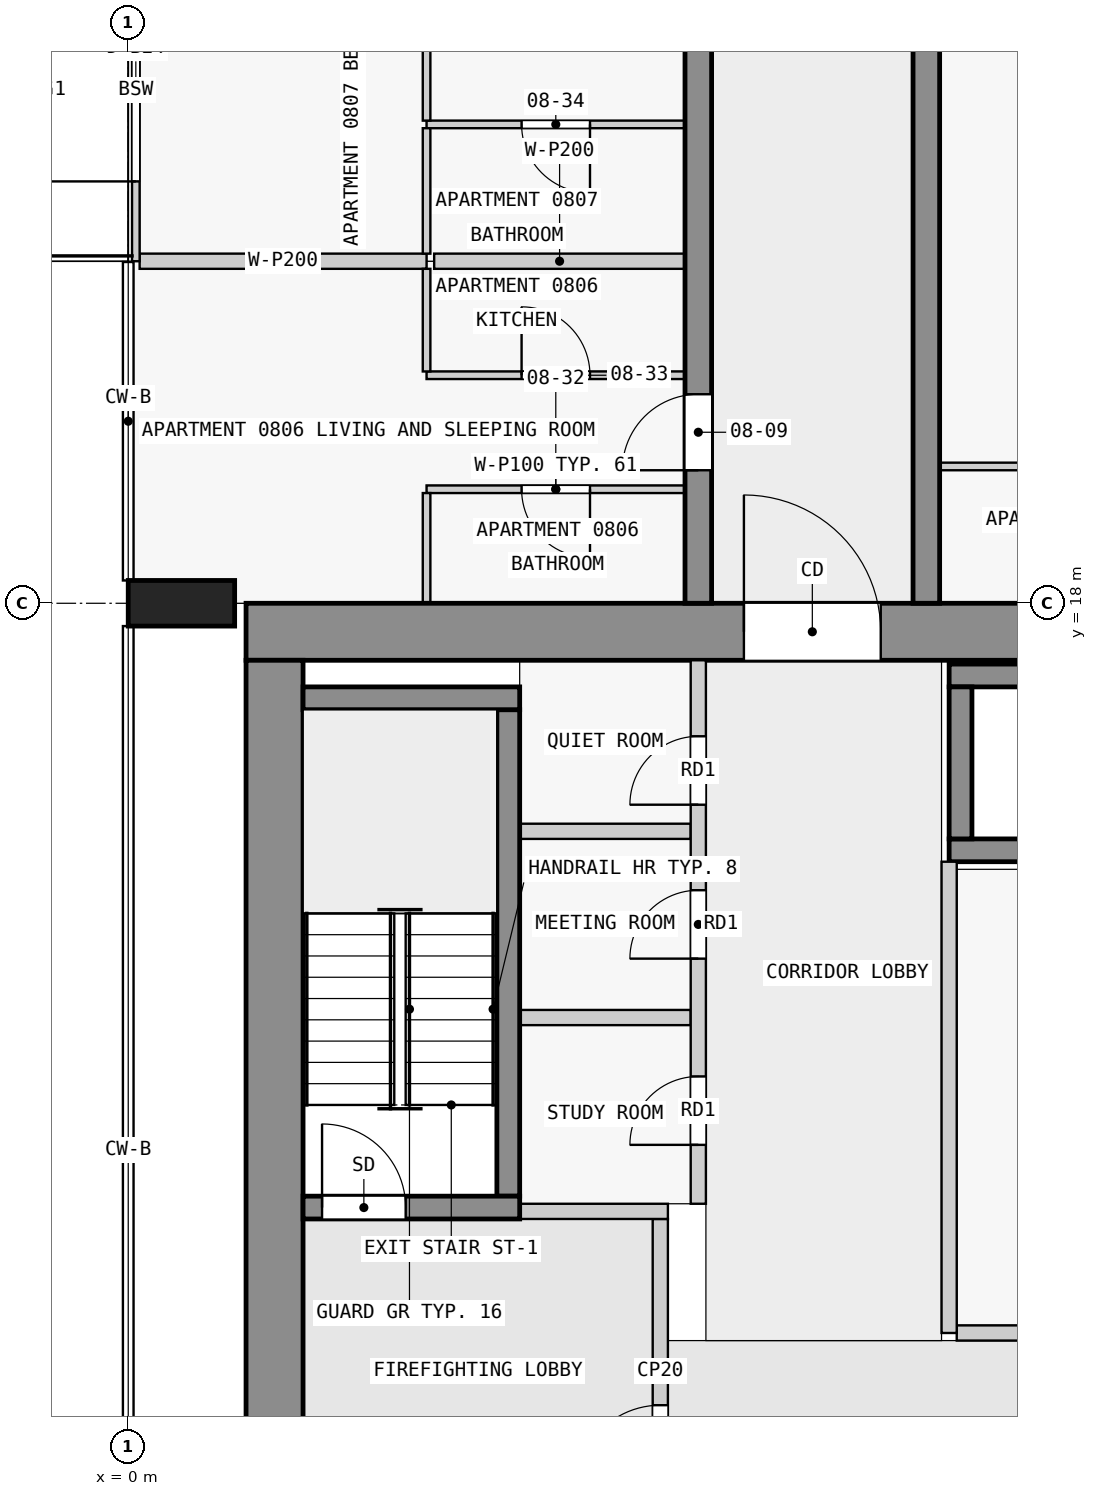
"""IFC4 building model, lengths in metres.
Left out: names, types, materials, properties, quantities, classifications, styles, units other than length and angle.
Written with IfcOpenShell. Run it as: python <this file> out.ifc"""

import sys

from ifc_helpers import new_model, si_unit, direction, frame, frame_2d, origin, origin_2d, place, context, subcontext, project, spatial, rectangle, extrude, element, fill, save


model = new_model("IFC4")
c1 = context("Model", 3, precision=1e-05, world=origin(), true_north=direction((0.0, 1.0)))
c2 = subcontext(c1, "Body", "Model", "MODEL_VIEW")
j1 = project(units=[si_unit("LENGTHUNIT", "METRE"), si_unit("PLANEANGLEUNIT", "RADIAN")], contexts=[c1])
p1 = place(None, origin())
s1 = spatial("IfcSite", under=j1, at=p1, CompositionType="ELEMENT")
p2 = place(p1, origin())
s2 = spatial("IfcBuilding", under=s1, at=p2, CompositionType="ELEMENT")
p3 = place(p2, frame((0.0, 0.0, 37.3)))
s3 = spatial("IfcBuildingStorey", under=s2, at=p3, CompositionType="ELEMENT", Elevation=37.3)
p4 = place(p3, frame((0.7, 18.0, 0.0), z_axis=(0.0, 0.0, 1.0), x_axis=(0.0, 1.0, 0.0)))
e1 = element("IfcColumn", 1, at=p4, inside=s3, PredefinedType="COLUMN", context=c2, shape_type="SweptSolid", body=[
    extrude(rectangle(XDim=0.6, YDim=1.4, at=origin_2d()), origin(), (0.0, 0.0, 1.0), 3.5),
])
p5 = place(p3, frame((1.55, 17.625, 0.0), z_axis=(0.0, 0.0, 1.0), x_axis=(1.0, 0.0, 0.0)))
e2 = element("IfcWall", 2, at=p5, inside=s3, PredefinedType="SHEAR", context=c2, shape_type="SweptSolid", body=[
    extrude(rectangle(XDim=20.95, YDim=0.75, at=frame_2d((10.475, 0.0))), origin(), (0.0, 0.0, 1.0), 3.25),
])
p6 = place(p5, frame((6.55, 0.0, 0.0)))
e3 = element("IfcOpeningElement", 3, at=p6, cuts=e2, PredefinedType="OPENING", context=c2, shape_type="SweptSolid", body=[
    extrude(rectangle(XDim=1.8, YDim=2.1, at=frame_2d((0.9, 1.05))), frame((0.0, 0.385, 0.0), z_axis=(0.0, -1.0, 0.0), x_axis=(1.0, 0.0, 0.0)), (0.0, 0.0, 1.0), 0.77),
])
p7 = place(p3, frame((1.925, 2.5, 0.0), z_axis=(0.0, 0.0, 1.0), x_axis=(0.0, 1.0, 0.0)))
e4 = element("IfcWall", 4, at=p7, inside=s3, PredefinedType="SHEAR", context=c2, shape_type="SweptSolid", body=[
    extrude(rectangle(XDim=14.75, YDim=0.75, at=frame_2d((7.375, 0.0))), origin(), (0.0, 0.0, 1.0), 3.25),
])
p8 = place(p3, frame((2.3, 10.05, 0.0), z_axis=(0.0, 0.0, 1.0), x_axis=(1.0, 0.0, 0.0)))
e5 = element("IfcWall", 5, at=p8, inside=s3, PredefinedType="SHEAR", context=c2, shape_type="SweptSolid", body=[
    extrude(rectangle(XDim=2.85, YDim=0.3, at=frame_2d((1.425, 0.0))), origin(), (0.0, 0.0, 1.0), 3.25),
])
p9 = place(p8, frame((0.25, 0.0, 0.0)))
e6 = element("IfcOpeningElement", 6, at=p9, cuts=e5, PredefinedType="OPENING", context=c2, shape_type="SweptSolid", body=[
    extrude(rectangle(XDim=1.1, YDim=2.1, at=frame_2d((0.55, 1.05))), frame((0.0, 0.16, 0.0), z_axis=(0.0, -1.0, 0.0), x_axis=(1.0, 0.0, 0.0)), (0.0, 0.0, 1.0), 0.32),
])
p10 = place(p3, frame((5.0, 10.2, 0.0), z_axis=(0.0, 0.0, 1.0), x_axis=(0.0, 1.0, 0.0)))
e7 = element("IfcWall", 7, at=p10, inside=s3, PredefinedType="SHEAR", context=c2, shape_type="SweptSolid", body=[
    extrude(rectangle(XDim=6.4, YDim=0.3, at=frame_2d((3.2, 0.0))), origin(), (0.0, 0.0, 1.0), 3.25),
])
p11 = place(p3, frame((2.3, 16.75, 0.0), z_axis=(0.0, 0.0, 1.0), x_axis=(1.0, 0.0, 0.0)))
e8 = element("IfcWall", 8, at=p11, inside=s3, PredefinedType="SHEAR", context=c2, shape_type="SweptSolid", body=[
    extrude(rectangle(XDim=2.85, YDim=0.3, at=frame_2d((1.425, 0.0))), origin(), (0.0, 0.0, 1.0), 3.25),
])
for number, where, z_axis, x_axis in (
    (9, (10.8, 17.05, 0.0), (0.0, 0.0, 1.0), (1.0, 0.0, 0.0)),
    (10, (10.8, 14.75, 0.0), (0.0, 0.0, 1.0), (1.0, 0.0, 0.0)),
):
    element("IfcWall", number, at=place(p3, frame(where, z_axis=z_axis, x_axis=x_axis)), inside=s3, PredefinedType="SHEAR", context=c2, shape_type="SweptSolid", body=[
        extrude(rectangle(XDim=7.8, YDim=0.3, at=frame_2d((3.9, 0.0))), origin(), (0.0, 0.0, 1.0), 3.25),
    ])
p12 = place(p3, frame((10.95, 14.9, 0.0), z_axis=(0.0, 0.0, 1.0), x_axis=(0.0, 1.0, 0.0)))
e11 = element("IfcWall", 11, at=p12, inside=s3, PredefinedType="SHEAR", context=c2, shape_type="SweptSolid", body=[
    extrude(rectangle(XDim=2.0, YDim=0.3, at=frame_2d((1.0, 0.0))), origin(), (0.0, 0.0, 1.0), 3.25),
])
p13 = place(p3, frame((7.5, 18.0, 0.0), z_axis=(0.0, 0.0, 1.0), x_axis=(0.0, 1.0, 0.0)))
e12 = element("IfcWall", 12, at=p13, inside=s3, PredefinedType="SHEAR", context=c2, shape_type="SweptSolid", body=[
    extrude(rectangle(XDim=27.0, YDim=0.35, at=frame_2d((13.5, 0.0))), origin(), (0.0, 0.0, 1.0), 3.25),
])
p14 = place(p13, frame((1.75, 0.0, 0.0)))
e13 = element("IfcOpeningElement", 13, at=p14, cuts=e12, PredefinedType="OPENING", context=c2, shape_type="SweptSolid", body=[
    extrude(rectangle(XDim=1.0, YDim=2.1, at=frame_2d((0.5, 1.05))), frame((0.0, 0.185, 0.0), z_axis=(0.0, -1.0, 0.0), x_axis=(1.0, 0.0, 0.0)), (0.0, 0.0, 1.0), 0.37),
])
p15 = place(p13, frame((8.55, 0.0, 0.0)))
e14 = element("IfcOpeningElement", 14, at=p15, cuts=e12, PredefinedType="OPENING", context=c2, shape_type="SweptSolid", body=[
    extrude(rectangle(XDim=1.0, YDim=2.1, at=frame_2d((0.5, 1.05))), frame((0.0, 0.185, 0.0), z_axis=(0.0, -1.0, 0.0), x_axis=(1.0, 0.0, 0.0)), (0.0, 0.0, 1.0), 0.37),
])
p16 = place(p13, frame((15.25, 0.0, 0.0)))
e15 = element("IfcOpeningElement", 15, at=p16, cuts=e12, PredefinedType="OPENING", context=c2, shape_type="SweptSolid", body=[
    extrude(rectangle(XDim=1.0, YDim=2.1, at=frame_2d((0.5, 1.05))), frame((0.0, 0.185, 0.0), z_axis=(0.0, -1.0, 0.0), x_axis=(1.0, 0.0, 0.0)), (0.0, 0.0, 1.0), 0.37),
])
p17 = place(p13, frame((21.35, 0.0, 0.0)))
e16 = element("IfcOpeningElement", 16, at=p17, cuts=e12, PredefinedType="OPENING", context=c2, shape_type="SweptSolid", body=[
    extrude(rectangle(XDim=1.0, YDim=2.1, at=frame_2d((0.5, 1.05))), frame((0.0, 0.185, 0.0), z_axis=(0.0, -1.0, 0.0), x_axis=(1.0, 0.0, 0.0)), (0.0, 0.0, 1.0), 0.37),
])
p18 = place(p3, frame((10.5, 18.0, 0.0), z_axis=(0.0, 0.0, 1.0), x_axis=(0.0, 1.0, 0.0)))
e17 = element("IfcWall", 17, at=p18, inside=s3, PredefinedType="SHEAR", context=c2, shape_type="SweptSolid", body=[
    extrude(rectangle(XDim=27.0, YDim=0.35, at=frame_2d((13.5, 0.0))), origin(), (0.0, 0.0, 1.0), 3.25),
])
p19 = place(p18, frame((7.45, 0.0, 0.0)))
e18 = element("IfcOpeningElement", 18, at=p19, cuts=e17, PredefinedType="OPENING", context=c2, shape_type="SweptSolid", body=[
    extrude(rectangle(XDim=1.0, YDim=2.1, at=frame_2d((0.5, 1.05))), frame((0.0, 0.185, 0.0), z_axis=(0.0, -1.0, 0.0), x_axis=(1.0, 0.0, 0.0)), (0.0, 0.0, 1.0), 0.37),
])
p20 = place(p18, frame((19.75, 0.0, 0.0)))
e19 = element("IfcOpeningElement", 19, at=p20, cuts=e17, PredefinedType="OPENING", context=c2, shape_type="SweptSolid", body=[
    extrude(rectangle(XDim=1.0, YDim=2.1, at=frame_2d((0.5, 1.05))), frame((0.0, 0.185, 0.0), z_axis=(0.0, -1.0, 0.0), x_axis=(1.0, 0.0, 0.0)), (0.0, 0.0, 1.0), 0.37),
])
p21 = place(p18, frame((23.25, 0.0, 0.0)))
e20 = element("IfcOpeningElement", 20, at=p21, cuts=e17, PredefinedType="OPENING", context=c2, shape_type="SweptSolid", body=[
    extrude(rectangle(XDim=0.9, YDim=2.1, at=frame_2d((0.45, 1.05))), frame((0.0, 0.185, 0.0), z_axis=(0.0, -1.0, 0.0), x_axis=(1.0, 0.0, 0.0)), (0.0, 0.0, 1.0), 0.37),
])
p22 = place(p18, frame((25.45, 0.0, 0.0)))
e21 = element("IfcOpeningElement", 21, at=p22, cuts=e17, PredefinedType="OPENING", context=c2, shape_type="SweptSolid", body=[
    extrude(rectangle(XDim=1.0, YDim=2.1, at=frame_2d((0.5, 1.05))), frame((0.0, 0.185, 0.0), z_axis=(0.0, -1.0, 0.0), x_axis=(1.0, 0.0, 0.0)), (0.0, 0.0, 1.0), 0.37),
])
p23 = place(p3, frame((0.1, 22.5, 0.0), z_axis=(0.0, 0.0, 1.0), x_axis=(0.0, 1.0, 0.0)))
e22 = element("IfcWall", 22, at=p23, inside=s3, PredefinedType="STANDARD", context=c2, shape_type="SweptSolid", body=[
    extrude(rectangle(XDim=4.5, YDim=0.1, at=frame_2d((2.25, 0.0))), origin(), (0.0, 0.0, 1.0), 3.25),
])
p24 = place(p23, frame((1.05, 0.0, 0.0)))
e23 = element("IfcOpeningElement", 23, at=p24, cuts=e22, PredefinedType="OPENING", context=c2, shape_type="SweptSolid", body=[
    extrude(rectangle(XDim=2.4, YDim=2.4, at=frame_2d((1.2, 1.2))), frame((0.0, 0.06, 0.0), z_axis=(0.0, -1.0, 0.0), x_axis=(1.0, 0.0, 0.0)), (0.0, 0.0, 1.0), 0.12),
])
p25 = place(p3, frame((7.0, 5.9, 0.0), z_axis=(0.0, 0.0, 1.0), x_axis=(0.0, 1.0, 0.0)))
e24 = element("IfcWall", 24, at=p25, inside=s3, PredefinedType="PARTITIONING", context=c2, shape_type="SweptSolid", body=[
    extrude(rectangle(XDim=4.0, YDim=0.2, at=frame_2d((2.0, 0.0))), origin(), (0.0, 0.0, 1.0), 3.25),
])
p26 = place(p25, frame((0.45, 0.0, 0.0)))
e25 = element("IfcOpeningElement", 25, at=p26, cuts=e24, PredefinedType="OPENING", context=c2, shape_type="SweptSolid", body=[
    extrude(rectangle(XDim=1.1, YDim=2.1, at=frame_2d((0.55, 1.05))), frame((0.0, 0.11, 0.0), z_axis=(0.0, -1.0, 0.0), x_axis=(1.0, 0.0, 0.0)), (0.0, 0.0, 1.0), 0.22),
])
p27 = place(p3, frame((5.15, 10.0, 0.0), z_axis=(0.0, 0.0, 1.0), x_axis=(1.0, 0.0, 0.0)))
e26 = element("IfcWall", 26, at=p27, inside=s3, PredefinedType="PARTITIONING", context=c2, shape_type="SweptSolid", body=[
    extrude(rectangle(XDim=1.95, YDim=0.2, at=frame_2d((0.975, 0.0))), origin(), (0.0, 0.0, 1.0), 3.25),
])
p28 = place(p3, frame((10.8, 8.4, 0.0), z_axis=(0.0, 0.0, 1.0), x_axis=(0.0, 1.0, 0.0)))
e27 = element("IfcWall", 27, at=p28, inside=s3, PredefinedType="PARTITIONING", context=c2, shape_type="SweptSolid", body=[
    extrude(rectangle(XDim=6.2, YDim=0.2, at=frame_2d((3.1, 0.0))), origin(), (0.0, 0.0, 1.0), 3.25),
])
p29 = place(p3, frame((10.9, 8.4, 0.0), z_axis=(0.0, 0.0, 1.0), x_axis=(1.0, 0.0, 0.0)))
e28 = element("IfcWall", 28, at=p29, inside=s3, PredefinedType="PARTITIONING", context=c2, shape_type="SweptSolid", body=[
    extrude(rectangle(XDim=7.4, YDim=0.2, at=frame_2d((3.7, 0.0))), origin(), (0.0, 0.0, 1.0), 3.25),
])
p30 = place(p3, frame((7.5, 10.1, 0.0), z_axis=(0.0, 0.0, 1.0), x_axis=(0.0, 1.0, 0.0)))
e29 = element("IfcWall", 29, at=p30, inside=s3, PredefinedType="PARTITIONING", context=c2, shape_type="SweptSolid", body=[
    extrude(rectangle(XDim=7.15, YDim=0.2, at=frame_2d((3.575, 0.0))), origin(), (0.0, 0.0, 1.0), 3.25),
])
p31 = place(p30, frame((0.775, 0.0, 0.0)))
e30 = element("IfcOpeningElement", 30, at=p31, cuts=e29, PredefinedType="OPENING", context=c2, shape_type="SweptSolid", body=[
    extrude(rectangle(XDim=0.9, YDim=2.1, at=frame_2d((0.45, 1.05))), frame((0.0, 0.11, 0.0), z_axis=(0.0, -1.0, 0.0), x_axis=(1.0, 0.0, 0.0)), (0.0, 0.0, 1.0), 0.22),
])
p32 = place(p30, frame((3.225, 0.0, 0.0)))
e31 = element("IfcOpeningElement", 31, at=p32, cuts=e29, PredefinedType="OPENING", context=c2, shape_type="SweptSolid", body=[
    extrude(rectangle(XDim=0.9, YDim=2.1, at=frame_2d((0.45, 1.05))), frame((0.0, 0.11, 0.0), z_axis=(0.0, -1.0, 0.0), x_axis=(1.0, 0.0, 0.0)), (0.0, 0.0, 1.0), 0.22),
])
p33 = place(p30, frame((5.25, 0.0, 0.0)))
e32 = element("IfcOpeningElement", 32, at=p33, cuts=e29, PredefinedType="OPENING", context=c2, shape_type="SweptSolid", body=[
    extrude(rectangle(XDim=0.9, YDim=2.1, at=frame_2d((0.45, 1.05))), frame((0.0, 0.11, 0.0), z_axis=(0.0, -1.0, 0.0), x_axis=(1.0, 0.0, 0.0)), (0.0, 0.0, 1.0), 0.22),
])
for number, where, z_axis, x_axis in (
    (33, (5.15, 12.55, 0.0), (0.0, 0.0, 1.0), (1.0, 0.0, 0.0)),
    (34, (5.15, 15.0, 0.0), (0.0, 0.0, 1.0), (1.0, 0.0, 0.0)),
):
    element("IfcWall", number, at=place(p3, frame(where, z_axis=z_axis, x_axis=x_axis)), inside=s3, PredefinedType="PARTITIONING", context=c2, shape_type="SweptSolid", body=[
        extrude(rectangle(XDim=2.25, YDim=0.2, at=frame_2d((1.125, 0.0))), origin(), (0.0, 0.0, 1.0), 3.25),
    ])
p34 = place(p3, frame((7.325, 19.5, 0.0), z_axis=(0.0, 0.0, 1.0), x_axis=(-1.0, 0.0, 0.0)))
e35 = element("IfcWall", 35, at=p34, inside=s3, PredefinedType="PARTITIONING", context=c2, shape_type="SweptSolid", body=[
    extrude(rectangle(XDim=3.4, YDim=0.1, at=frame_2d((1.7, 0.0))), origin(), (0.0, 0.0, 1.0), 3.25),
])
p35 = place(p34, frame((1.25, 0.0, 0.0)))
e36 = element("IfcOpeningElement", 36, at=p35, cuts=e35, PredefinedType="OPENING", context=c2, shape_type="SweptSolid", body=[
    extrude(rectangle(XDim=0.9, YDim=2.1, at=frame_2d((0.45, 1.05))), frame((0.0, 0.06, 0.0), z_axis=(0.0, -1.0, 0.0), x_axis=(1.0, 0.0, 0.0)), (0.0, 0.0, 1.0), 0.12),
])
p36 = place(p3, frame((14.025, 19.8, 0.0), z_axis=(0.0, 0.0, 1.0), x_axis=(-1.0, 0.0, 0.0)))
e37 = element("IfcWall", 37, at=p36, inside=s3, PredefinedType="PARTITIONING", context=c2, shape_type="SweptSolid", body=[
    extrude(rectangle(XDim=3.35, YDim=0.1, at=frame_2d((1.675, 0.0))), origin(), (0.0, 0.0, 1.0), 3.25),
])
p37 = place(p36, frame((1.25, 0.0, 0.0)))
e38 = element("IfcOpeningElement", 38, at=p37, cuts=e37, PredefinedType="OPENING", context=c2, shape_type="SweptSolid", body=[
    extrude(rectangle(XDim=0.9, YDim=2.1, at=frame_2d((0.45, 1.05))), frame((0.0, 0.06, 0.0), z_axis=(0.0, -1.0, 0.0), x_axis=(1.0, 0.0, 0.0)), (0.0, 0.0, 1.0), 0.12),
])
p38 = place(p3, frame((3.925, 21.0, 0.0), z_axis=(0.0, 0.0, 1.0), x_axis=(1.0, 0.0, 0.0)))
e39 = element("IfcWall", 39, at=p38, inside=s3, PredefinedType="PARTITIONING", context=c2, shape_type="SweptSolid", body=[
    extrude(rectangle(XDim=3.4, YDim=0.1, at=frame_2d((1.7, 0.0))), origin(), (0.0, 0.0, 1.0), 3.25),
])
p39 = place(p38, frame((1.25, 0.0, 0.0)))
e40 = element("IfcOpeningElement", 40, at=p39, cuts=e39, PredefinedType="OPENING", context=c2, shape_type="SweptSolid", body=[
    extrude(rectangle(XDim=0.9, YDim=2.1, at=frame_2d((0.45, 1.05))), frame((0.0, 0.06, 0.0), z_axis=(0.0, -1.0, 0.0), x_axis=(1.0, 0.0, 0.0)), (0.0, 0.0, 1.0), 0.12),
])
p40 = place(p3, frame((7.325, 22.5, 0.0), z_axis=(0.0, 0.0, 1.0), x_axis=(-1.0, 0.0, 0.0)))
e41 = element("IfcWall", 41, at=p40, inside=s3, PredefinedType="PARTITIONING", context=c2, shape_type="SweptSolid", body=[
    extrude(rectangle(XDim=3.3, YDim=0.2, at=frame_2d((1.65, 0.0))), origin(), (0.0, 0.0, 1.0), 3.25),
])
p41 = place(p3, frame((0.15, 22.5, 0.0), z_axis=(0.0, 0.0, 1.0), x_axis=(1.0, 0.0, 0.0)))
e42 = element("IfcWall", 42, at=p41, inside=s3, PredefinedType="PARTITIONING", context=c2, shape_type="SweptSolid", body=[
    extrude(rectangle(XDim=3.775, YDim=0.2, at=frame_2d((1.888, 0.0))), origin(), (0.0, 0.0, 1.0), 3.25),
])
p42 = place(p3, frame((7.325, 24.3, 0.0), z_axis=(0.0, 0.0, 1.0), x_axis=(-1.0, 0.0, 0.0)))
e43 = element("IfcWall", 43, at=p42, inside=s3, PredefinedType="PARTITIONING", context=c2, shape_type="SweptSolid", body=[
    extrude(rectangle(XDim=3.4, YDim=0.1, at=frame_2d((1.7, 0.0))), origin(), (0.0, 0.0, 1.0), 3.25),
])
p43 = place(p42, frame((1.25, 0.0, 0.0)))
e44 = element("IfcOpeningElement", 44, at=p43, cuts=e43, PredefinedType="OPENING", context=c2, shape_type="SweptSolid", body=[
    extrude(rectangle(XDim=0.9, YDim=2.1, at=frame_2d((0.45, 1.05))), frame((0.0, 0.06, 0.0), z_axis=(0.0, -1.0, 0.0), x_axis=(1.0, 0.0, 0.0)), (0.0, 0.0, 1.0), 0.12),
])
p44 = place(p3, frame((3.925, 19.45, 0.0), z_axis=(0.0, 0.0, 1.0), x_axis=(0.0, -1.0, 0.0)))
e45 = element("IfcWall", 45, at=p44, inside=s3, PredefinedType="PARTITIONING", context=c2, shape_type="SweptSolid", body=[
    extrude(rectangle(XDim=1.45, YDim=0.1, at=frame_2d((0.725, 0.0))), origin(), (0.0, 0.0, 1.0), 3.25),
])
p45 = place(p3, frame((3.925, 22.4, 0.0), z_axis=(0.0, 0.0, 1.0), x_axis=(0.0, -1.0, 0.0)))
e46 = element("IfcWall", 46, at=p45, inside=s3, PredefinedType="PARTITIONING", context=c2, shape_type="SweptSolid", body=[
    extrude(rectangle(XDim=1.35, YDim=0.1, at=frame_2d((0.675, 0.0))), origin(), (0.0, 0.0, 1.0), 3.25),
])
p46 = place(p3, frame((3.925, 24.25, 0.0), z_axis=(0.0, 0.0, 1.0), x_axis=(0.0, -1.0, 0.0)))
e47 = element("IfcWall", 47, at=p46, inside=s3, PredefinedType="PARTITIONING", context=c2, shape_type="SweptSolid", body=[
    extrude(rectangle(XDim=1.65, YDim=0.1, at=frame_2d((0.825, 0.0))), origin(), (0.0, 0.0, 1.0), 3.25),
])
p47 = place(p3, frame((3.925, 24.35, 0.0), z_axis=(0.0, 0.0, 1.0), x_axis=(0.0, 1.0, 0.0)))
e48 = element("IfcWall", 48, at=p47, inside=s3, PredefinedType="PARTITIONING", context=c2, shape_type="SweptSolid", body=[
    extrude(rectangle(XDim=2.6, YDim=0.1, at=frame_2d((1.3, 0.0))), origin(), (0.0, 0.0, 1.0), 3.25),
])
p48 = place(p24, origin())
e49 = element("IfcDoor", 49, at=p48, inside=s3, OperationType="SINGLE_SWING_LEFT", PredefinedType="DOOR", context=c2, shape_type="SweptSolid", body=[
    extrude(rectangle(XDim=2.4, YDim=2.4, at=frame_2d((1.2, 1.2))), frame((0.0, 0.025, 0.0), z_axis=(0.0, -1.0, 0.0), x_axis=(1.0, 0.0, 0.0)), (0.0, 0.0, 1.0), 0.05),
])
fill(e23, e49)
p49 = place(p26, origin())
e50 = element("IfcDoor", 50, at=p49, inside=s3, OperationType="SINGLE_SWING_LEFT", PredefinedType="DOOR", context=c2, shape_type="SweptSolid", body=[
    extrude(rectangle(XDim=1.1, YDim=2.1, at=frame_2d((0.55, 1.05))), frame((0.0, 0.025, 0.0), z_axis=(0.0, -1.0, 0.0), x_axis=(1.0, 0.0, 0.0)), (0.0, 0.0, 1.0), 0.05),
])
fill(e25, e50)
p50 = place(p9, origin())
e51 = element("IfcDoor", 51, at=p50, inside=s3, OperationType="SINGLE_SWING_RIGHT", PredefinedType="DOOR", context=c2, shape_type="SweptSolid", body=[
    extrude(rectangle(XDim=1.1, YDim=2.1, at=frame_2d((0.55, 1.05))), frame((0.0, 0.025, 0.0), z_axis=(0.0, -1.0, 0.0), x_axis=(1.0, 0.0, 0.0)), (0.0, 0.0, 1.0), 0.05),
])
fill(e6, e51)
p51 = place(p6, origin())
e52 = element("IfcDoor", 52, at=p51, inside=s3, OperationType="DOUBLE_DOOR_SINGLE_SWING", PredefinedType="DOOR", context=c2, shape_type="SweptSolid", body=[
    extrude(rectangle(XDim=1.8, YDim=2.1, at=frame_2d((0.9, 1.05))), frame((0.0, 0.025, 0.0), z_axis=(0.0, -1.0, 0.0), x_axis=(1.0, 0.0, 0.0)), (0.0, 0.0, 1.0), 0.05),
])
fill(e3, e52)
p52 = place(p31, origin())
e53 = element("IfcDoor", 53, at=p52, inside=s3, OperationType="SINGLE_SWING_RIGHT", PredefinedType="DOOR", context=c2, shape_type="SweptSolid", body=[
    extrude(rectangle(XDim=0.9, YDim=2.1, at=frame_2d((0.45, 1.05))), frame((0.0, 0.025, 0.0), z_axis=(0.0, -1.0, 0.0), x_axis=(1.0, 0.0, 0.0)), (0.0, 0.0, 1.0), 0.05),
])
fill(e30, e53)
p53 = place(p32, origin())
e54 = element("IfcDoor", 54, at=p53, inside=s3, OperationType="SINGLE_SWING_RIGHT", PredefinedType="DOOR", context=c2, shape_type="SweptSolid", body=[
    extrude(rectangle(XDim=0.9, YDim=2.1, at=frame_2d((0.45, 1.05))), frame((0.0, 0.025, 0.0), z_axis=(0.0, -1.0, 0.0), x_axis=(1.0, 0.0, 0.0)), (0.0, 0.0, 1.0), 0.05),
])
fill(e31, e54)
p54 = place(p33, origin())
e55 = element("IfcDoor", 55, at=p54, inside=s3, OperationType="SINGLE_SWING_RIGHT", PredefinedType="DOOR", context=c2, shape_type="SweptSolid", body=[
    extrude(rectangle(XDim=0.9, YDim=2.1, at=frame_2d((0.45, 1.05))), frame((0.0, 0.025, 0.0), z_axis=(0.0, -1.0, 0.0), x_axis=(1.0, 0.0, 0.0)), (0.0, 0.0, 1.0), 0.05),
])
fill(e32, e55)
p55 = place(p14, origin())
e56 = element("IfcDoor", 56, at=p55, inside=s3, OperationType="SINGLE_SWING_LEFT", PredefinedType="DOOR", context=c2, shape_type="SweptSolid", body=[
    extrude(rectangle(XDim=1.0, YDim=2.1, at=frame_2d((0.5, 1.05))), frame((0.0, 0.025, 0.0), z_axis=(0.0, -1.0, 0.0), x_axis=(1.0, 0.0, 0.0)), (0.0, 0.0, 1.0), 0.05),
])
fill(e13, e56)
p56 = place(p35, origin())
e57 = element("IfcDoor", 57, at=p56, inside=s3, OperationType="SINGLE_SWING_LEFT", PredefinedType="DOOR", context=c2, shape_type="SweptSolid", body=[
    extrude(rectangle(XDim=0.9, YDim=2.1, at=frame_2d((0.45, 1.05))), frame((0.0, 0.025, 0.0), z_axis=(0.0, -1.0, 0.0), x_axis=(1.0, 0.0, 0.0)), (0.0, 0.0, 1.0), 0.05),
])
fill(e36, e57)
p57 = place(p39, origin())
e58 = element("IfcDoor", 58, at=p57, inside=s3, OperationType="SINGLE_SWING_LEFT", PredefinedType="DOOR", context=c2, shape_type="SweptSolid", body=[
    extrude(rectangle(XDim=0.9, YDim=2.1, at=frame_2d((0.45, 1.05))), frame((0.0, 0.025, 0.0), z_axis=(0.0, -1.0, 0.0), x_axis=(1.0, 0.0, 0.0)), (0.0, 0.0, 1.0), 0.05),
])
fill(e40, e58)
p58 = place(p43, origin())
e59 = element("IfcDoor", 59, at=p58, inside=s3, OperationType="SINGLE_SWING_LEFT", PredefinedType="DOOR", context=c2, shape_type="SweptSolid", body=[
    extrude(rectangle(XDim=0.9, YDim=2.1, at=frame_2d((0.45, 1.05))), frame((0.0, 0.025, 0.0), z_axis=(0.0, -1.0, 0.0), x_axis=(1.0, 0.0, 0.0)), (0.0, 0.0, 1.0), 0.05),
])
fill(e44, e59)
save(model, sys.argv[1])
